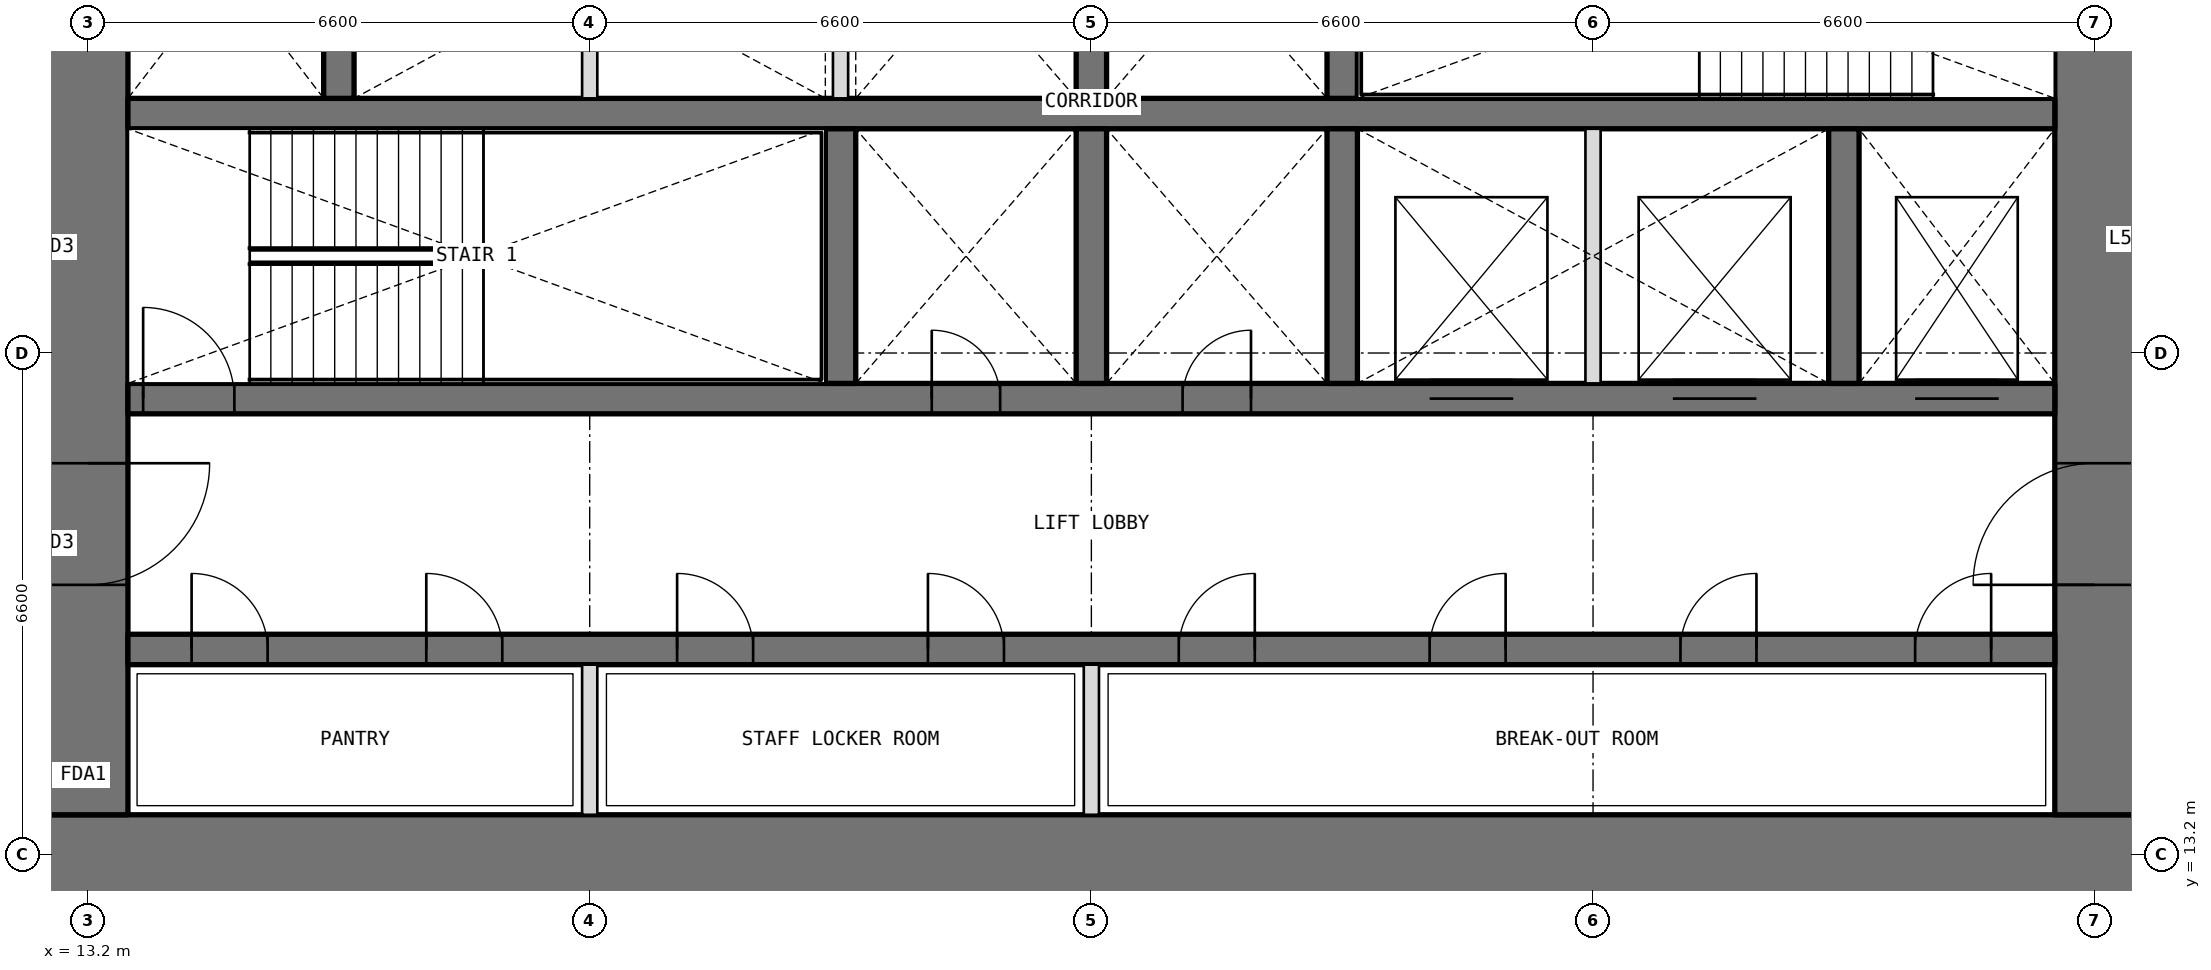
"""IFC4 building model, lengths in metres.
Left out: names, types, materials, properties, quantities, classifications, styles, units other than length and angle.
Written with IfcOpenShell. Run it as: python <this file> out.ifc"""

import sys

from ifc_helpers import new_model, si_unit, direction, frame, frame_2d, origin, place, context, subcontext, project, spatial, rectangle, extrude, element, fill, save


model = new_model("IFC4")
c1 = context("Model", 3, precision=1e-05, world=origin(), true_north=direction((0.0, 1.0)))
c2 = subcontext(c1, "Body", "Model", "MODEL_VIEW")
j1 = project(units=[si_unit("LENGTHUNIT", "METRE"), si_unit("PLANEANGLEUNIT", "RADIAN")], contexts=[c1])
p1 = place(None, origin())
s1 = spatial("IfcSite", under=j1, at=p1, CompositionType="ELEMENT")
p2 = place(p1, origin())
s2 = spatial("IfcBuilding", under=s1, at=p2, CompositionType="ELEMENT")
p3 = place(p2, frame((0.0, 0.0, 233.4)))
s3 = spatial("IfcBuildingStorey", under=s2, at=p3, CompositionType="ELEMENT", Elevation=233.4)
p4 = place(p3, frame((12.675, 13.2, 0.0), z_axis=(0.0, 0.0, 1.0), x_axis=(1.0, 0.0, 0.0)))
e1 = element("IfcWall", 1, at=p4, inside=s3, PredefinedType="SHEAR", context=c2, shape_type="SweptSolid", body=[
    extrude(rectangle(XDim=27.45, YDim=1.05, at=frame_2d((13.725, 0.0))), origin(), (0.0, 0.0, 1.0), 4.2),
])
p5 = place(p3, frame((39.6, 13.725, 0.0), z_axis=(0.0, 0.0, 1.0), x_axis=(0.0, 1.0, 0.0)))
e2 = element("IfcWall", 2, at=p5, inside=s3, PredefinedType="SHEAR", context=c2, shape_type="SweptSolid", body=[
    extrude(rectangle(XDim=18.75, YDim=1.05, at=frame_2d((9.375, 0.0))), origin(), (0.0, 0.0, 1.0), 4.2),
])
p6 = place(p5, frame((3.025, 0.0, 0.0)))
e3 = element("IfcOpeningElement", 3, at=p6, cuts=e2, PredefinedType="OPENING", context=c2, shape_type="SweptSolid", body=[
    extrude(rectangle(XDim=1.6, YDim=2.1, at=frame_2d((0.8, 1.05))), frame((0.0, 0.535, 0.0), z_axis=(0.0, -1.0, 0.0), x_axis=(1.0, 0.0, 0.0)), (0.0, 0.0, 1.0), 1.07),
])
p7 = place(p5, frame((13.825, 0.0, 0.0)))
e4 = element("IfcOpeningElement", 4, at=p7, cuts=e2, PredefinedType="OPENING", context=c2, shape_type="SweptSolid", body=[
    extrude(rectangle(XDim=1.6, YDim=2.1, at=frame_2d((0.8, 1.05))), frame((0.0, 0.535, 0.0), z_axis=(0.0, -1.0, 0.0), x_axis=(1.0, 0.0, 0.0)), (0.0, 0.0, 1.0), 1.07),
])
p8 = place(p3, frame((13.2, 32.475, 0.0), z_axis=(0.0, 0.0, 1.0), x_axis=(0.0, -1.0, 0.0)))
e5 = element("IfcWall", 5, at=p8, inside=s3, PredefinedType="SHEAR", context=c2, shape_type="SweptSolid", body=[
    extrude(rectangle(XDim=18.75, YDim=1.05, at=frame_2d((9.375, 0.0))), origin(), (0.0, 0.0, 1.0), 4.2),
])
p9 = place(p8, frame((14.125, 0.0, 0.0)))
e6 = element("IfcOpeningElement", 6, at=p9, cuts=e5, PredefinedType="OPENING", context=c2, shape_type="SweptSolid", body=[
    extrude(rectangle(XDim=1.6, YDim=2.1, at=frame_2d((0.8, 1.05))), frame((0.0, 0.535, 0.0), z_axis=(0.0, -1.0, 0.0), x_axis=(1.0, 0.0, 0.0)), (0.0, 0.0, 1.0), 1.07),
])
p10 = place(p8, frame((3.325, 0.0, 0.0)))
e7 = element("IfcOpeningElement", 7, at=p10, cuts=e5, PredefinedType="OPENING", context=c2, shape_type="SweptSolid", body=[
    extrude(rectangle(XDim=1.6, YDim=2.1, at=frame_2d((0.8, 1.05))), frame((0.0, 0.535, 0.0), z_axis=(0.0, -1.0, 0.0), x_axis=(1.0, 0.0, 0.0)), (0.0, 0.0, 1.0), 1.07),
])
p11 = place(p3, frame((13.725, 15.9, 0.0), z_axis=(0.0, 0.0, 1.0), x_axis=(1.0, 0.0, 0.0)))
e8 = element("IfcWall", 8, at=p11, inside=s3, PredefinedType="SHEAR", context=c2, shape_type="SweptSolid", body=[
    extrude(rectangle(XDim=25.35, YDim=0.4, at=frame_2d((12.675, 0.0))), origin(), (0.0, 0.0, 1.0), 4.2),
])
p12 = place(p11, frame((0.837, 0.0, 0.0)))
e9 = element("IfcOpeningElement", 9, at=p12, cuts=e8, PredefinedType="OPENING", context=c2, shape_type="SweptSolid", body=[
    extrude(rectangle(XDim=1.0, YDim=2.1, at=frame_2d((0.5, 1.05))), frame((0.0, 0.21, 0.0), z_axis=(0.0, -1.0, 0.0), x_axis=(1.0, 0.0, 0.0)), (0.0, 0.0, 1.0), 0.42),
])
p13 = place(p11, frame((3.925, 0.0, 0.0)))
e10 = element("IfcOpeningElement", 10, at=p13, cuts=e8, PredefinedType="OPENING", context=c2, shape_type="SweptSolid", body=[
    extrude(rectangle(XDim=1.0, YDim=2.1, at=frame_2d((0.5, 1.05))), frame((0.0, 0.21, 0.0), z_axis=(0.0, -1.0, 0.0), x_axis=(1.0, 0.0, 0.0)), (0.0, 0.0, 1.0), 0.42),
])
p14 = place(p11, frame((7.225, 0.0, 0.0)))
e11 = element("IfcOpeningElement", 11, at=p14, cuts=e8, PredefinedType="OPENING", context=c2, shape_type="SweptSolid", body=[
    extrude(rectangle(XDim=1.0, YDim=2.1, at=frame_2d((0.5, 1.05))), frame((0.0, 0.21, 0.0), z_axis=(0.0, -1.0, 0.0), x_axis=(1.0, 0.0, 0.0)), (0.0, 0.0, 1.0), 0.42),
])
p15 = place(p11, frame((10.525, 0.0, 0.0)))
e12 = element("IfcOpeningElement", 12, at=p15, cuts=e8, PredefinedType="OPENING", context=c2, shape_type="SweptSolid", body=[
    extrude(rectangle(XDim=1.0, YDim=2.1, at=frame_2d((0.5, 1.05))), frame((0.0, 0.21, 0.0), z_axis=(0.0, -1.0, 0.0), x_axis=(1.0, 0.0, 0.0)), (0.0, 0.0, 1.0), 0.42),
])
p16 = place(p11, frame((13.825, 0.0, 0.0)))
e13 = element("IfcOpeningElement", 13, at=p16, cuts=e8, PredefinedType="OPENING", context=c2, shape_type="SweptSolid", body=[
    extrude(rectangle(XDim=1.0, YDim=2.1, at=frame_2d((0.5, 1.05))), frame((0.0, 0.21, 0.0), z_axis=(0.0, -1.0, 0.0), x_axis=(1.0, 0.0, 0.0)), (0.0, 0.0, 1.0), 0.42),
])
p17 = place(p11, frame((17.125, 0.0, 0.0)))
e14 = element("IfcOpeningElement", 14, at=p17, cuts=e8, PredefinedType="OPENING", context=c2, shape_type="SweptSolid", body=[
    extrude(rectangle(XDim=1.0, YDim=2.1, at=frame_2d((0.5, 1.05))), frame((0.0, 0.21, 0.0), z_axis=(0.0, -1.0, 0.0), x_axis=(1.0, 0.0, 0.0)), (0.0, 0.0, 1.0), 0.42),
])
p18 = place(p11, frame((20.425, 0.0, 0.0)))
e15 = element("IfcOpeningElement", 15, at=p18, cuts=e8, PredefinedType="OPENING", context=c2, shape_type="SweptSolid", body=[
    extrude(rectangle(XDim=1.0, YDim=2.1, at=frame_2d((0.5, 1.05))), frame((0.0, 0.21, 0.0), z_axis=(0.0, -1.0, 0.0), x_axis=(1.0, 0.0, 0.0)), (0.0, 0.0, 1.0), 0.42),
])
p19 = place(p11, frame((23.512, 0.0, 0.0)))
e16 = element("IfcOpeningElement", 16, at=p19, cuts=e8, PredefinedType="OPENING", context=c2, shape_type="SweptSolid", body=[
    extrude(rectangle(XDim=1.0, YDim=2.1, at=frame_2d((0.5, 1.05))), frame((0.0, 0.21, 0.0), z_axis=(0.0, -1.0, 0.0), x_axis=(1.0, 0.0, 0.0)), (0.0, 0.0, 1.0), 0.42),
])
p20 = place(p3, frame((13.725, 19.2, 0.0), z_axis=(0.0, 0.0, 1.0), x_axis=(1.0, 0.0, 0.0)))
e17 = element("IfcWall", 17, at=p20, inside=s3, PredefinedType="SHEAR", context=c2, shape_type="SweptSolid", body=[
    extrude(rectangle(XDim=25.35, YDim=0.4, at=frame_2d((12.675, 0.0))), origin(), (0.0, 0.0, 1.0), 4.2),
])
p21 = place(p20, frame((10.575, 0.0, 0.0)))
e18 = element("IfcOpeningElement", 18, at=p21, cuts=e17, PredefinedType="OPENING", context=c2, shape_type="SweptSolid", body=[
    extrude(rectangle(XDim=0.9, YDim=2.1, at=frame_2d((0.45, 1.05))), frame((0.0, 0.21, 0.0), z_axis=(0.0, -1.0, 0.0), x_axis=(1.0, 0.0, 0.0)), (0.0, 0.0, 1.0), 0.42),
])
p22 = place(p20, frame((13.875, 0.0, 0.0)))
e19 = element("IfcOpeningElement", 19, at=p22, cuts=e17, PredefinedType="OPENING", context=c2, shape_type="SweptSolid", body=[
    extrude(rectangle(XDim=0.9, YDim=2.1, at=frame_2d((0.45, 1.05))), frame((0.0, 0.21, 0.0), z_axis=(0.0, -1.0, 0.0), x_axis=(1.0, 0.0, 0.0)), (0.0, 0.0, 1.0), 0.42),
])
p23 = place(p20, frame((0.2, 0.0, 0.0)))
e20 = element("IfcOpeningElement", 20, at=p23, cuts=e17, PredefinedType="OPENING", context=c2, shape_type="SweptSolid", body=[
    extrude(rectangle(XDim=1.2, YDim=2.1, at=frame_2d((0.6, 1.05))), frame((0.0, 0.21, 0.0), z_axis=(0.0, -1.0, 0.0), x_axis=(1.0, 0.0, 0.0)), (0.0, 0.0, 1.0), 0.42),
])
p24 = place(p20, frame((23.512, 0.0, 0.0)))
e21 = element("IfcOpeningElement", 21, at=p24, cuts=e17, PredefinedType="OPENING", context=c2, shape_type="SweptSolid", body=[
    extrude(rectangle(XDim=1.1, YDim=2.1, at=frame_2d((0.55, 1.05))), frame((0.0, 0.21, 0.0), z_axis=(0.0, -1.0, 0.0), x_axis=(1.0, 0.0, 0.0)), (0.0, 0.0, 1.0), 0.42),
])
p25 = place(p20, frame((17.125, 0.0, 0.0)))
e22 = element("IfcOpeningElement", 22, at=p25, cuts=e17, PredefinedType="OPENING", context=c2, shape_type="SweptSolid", body=[
    extrude(rectangle(XDim=1.1, YDim=2.1, at=frame_2d((0.55, 1.05))), frame((0.0, 0.21, 0.0), z_axis=(0.0, -1.0, 0.0), x_axis=(1.0, 0.0, 0.0)), (0.0, 0.0, 1.0), 0.42),
])
p26 = place(p20, frame((20.325, 0.0, 0.0)))
e23 = element("IfcOpeningElement", 23, at=p26, cuts=e17, PredefinedType="OPENING", context=c2, shape_type="SweptSolid", body=[
    extrude(rectangle(XDim=1.1, YDim=2.1, at=frame_2d((0.55, 1.05))), frame((0.0, 0.21, 0.0), z_axis=(0.0, -1.0, 0.0), x_axis=(1.0, 0.0, 0.0)), (0.0, 0.0, 1.0), 0.42),
])
p27 = place(p3, frame((13.725, 22.95, 0.0), z_axis=(0.0, 0.0, 1.0), x_axis=(1.0, 0.0, 0.0)))
e24 = element("IfcWall", 24, at=p27, inside=s3, PredefinedType="SHEAR", context=c2, shape_type="SweptSolid", body=[
    extrude(rectangle(XDim=25.35, YDim=0.4, at=frame_2d((12.675, 0.0))), origin(), (0.0, 0.0, 1.0), 4.2),
])
for number, where, z_axis, x_axis in (
    (25, (23.1, 19.4, 0.0), (0.0, 0.0, 1.0), (0.0, 1.0, 0.0)),
    (26, (26.4, 19.4, 0.0), (0.0, 0.0, 1.0), (0.0, 1.0, 0.0)),
    (27, (29.7, 19.4, 0.0), (0.0, 0.0, 1.0), (0.0, 1.0, 0.0)),
    (28, (36.3, 19.4, 0.0), (0.0, 0.0, 1.0), (0.0, 1.0, 0.0)),
    (29, (16.5, 23.15, 0.0), (0.0, 0.0, 1.0), (0.0, 1.0, 0.0)),
    (30, (26.4, 23.15, 0.0), (0.0, 0.0, 1.0), (0.0, 1.0, 0.0)),
    (31, (29.7, 23.15, 0.0), (0.0, 0.0, 1.0), (0.0, 1.0, 0.0)),
):
    element("IfcWall", number, at=place(p3, frame(where, z_axis=z_axis, x_axis=x_axis)), inside=s3, PredefinedType="SHEAR", context=c2, shape_type="SweptSolid", body=[
        extrude(rectangle(XDim=3.35, YDim=0.4, at=frame_2d((1.675, 0.0))), origin(), (0.0, 0.0, 1.0), 4.2),
    ])
for number, where, z_axis, x_axis in (
    (32, (19.8, 13.725, 0.0), (0.0, 0.0, 1.0), (0.0, 1.0, 0.0)),
    (33, (26.4, 13.725, 0.0), (0.0, 0.0, 1.0), (0.0, 1.0, 0.0)),
):
    element("IfcWall", number, at=place(p3, frame(where, z_axis=z_axis, x_axis=x_axis)), inside=s3, PredefinedType="PARTITIONING", context=c2, shape_type="SweptSolid", body=[
        extrude(rectangle(XDim=1.975, YDim=0.2, at=frame_2d((0.987, 0.0))), origin(), (0.0, 0.0, 1.0), 4.2),
    ])
for number, where, z_axis, x_axis in (
    (34, (33.0, 19.4, 0.0), (0.0, 0.0, 1.0), (0.0, 1.0, 0.0)),
    (35, (19.8, 23.15, 0.0), (0.0, 0.0, 1.0), (0.0, 1.0, 0.0)),
    (36, (23.1, 23.15, 0.0), (0.0, 0.0, 1.0), (0.0, 1.0, 0.0)),
):
    element("IfcWall", number, at=place(p3, frame(where, z_axis=z_axis, x_axis=x_axis)), inside=s3, PredefinedType="PARTITIONING", context=c2, shape_type="SweptSolid", body=[
        extrude(rectangle(XDim=3.35, YDim=0.2, at=frame_2d((1.675, 0.0))), origin(), (0.0, 0.0, 1.0), 4.2),
    ])
p28 = place(p21, origin())
e37 = element("IfcDoor", 37, at=p28, inside=s3, OperationType="SINGLE_SWING_LEFT", PredefinedType="DOOR", context=c2, shape_type="SweptSolid", body=[
    extrude(rectangle(XDim=0.9, YDim=2.1, at=frame_2d((0.45, 1.05))), frame((0.0, 0.025, 0.0), z_axis=(0.0, -1.0, 0.0), x_axis=(1.0, 0.0, 0.0)), (0.0, 0.0, 1.0), 0.05),
])
fill(e18, e37)
p29 = place(p22, origin())
e38 = element("IfcDoor", 38, at=p29, inside=s3, OperationType="SINGLE_SWING_RIGHT", PredefinedType="DOOR", context=c2, shape_type="SweptSolid", body=[
    extrude(rectangle(XDim=0.9, YDim=2.1, at=frame_2d((0.45, 1.05))), frame((0.0, 0.025, 0.0), z_axis=(0.0, -1.0, 0.0), x_axis=(1.0, 0.0, 0.0)), (0.0, 0.0, 1.0), 0.05),
])
fill(e19, e38)
p30 = place(p12, origin())
e39 = element("IfcDoor", 39, at=p30, inside=s3, OperationType="SINGLE_SWING_LEFT", PredefinedType="DOOR", context=c2, shape_type="SweptSolid", body=[
    extrude(rectangle(XDim=1.0, YDim=2.1, at=frame_2d((0.5, 1.05))), frame((0.0, 0.025, 0.0), z_axis=(0.0, -1.0, 0.0), x_axis=(1.0, 0.0, 0.0)), (0.0, 0.0, 1.0), 0.05),
])
fill(e9, e39)
p31 = place(p13, origin())
e40 = element("IfcDoor", 40, at=p31, inside=s3, OperationType="SINGLE_SWING_LEFT", PredefinedType="DOOR", context=c2, shape_type="SweptSolid", body=[
    extrude(rectangle(XDim=1.0, YDim=2.1, at=frame_2d((0.5, 1.05))), frame((0.0, 0.025, 0.0), z_axis=(0.0, -1.0, 0.0), x_axis=(1.0, 0.0, 0.0)), (0.0, 0.0, 1.0), 0.05),
])
fill(e10, e40)
p32 = place(p14, origin())
e41 = element("IfcDoor", 41, at=p32, inside=s3, OperationType="SINGLE_SWING_LEFT", PredefinedType="DOOR", context=c2, shape_type="SweptSolid", body=[
    extrude(rectangle(XDim=1.0, YDim=2.1, at=frame_2d((0.5, 1.05))), frame((0.0, 0.025, 0.0), z_axis=(0.0, -1.0, 0.0), x_axis=(1.0, 0.0, 0.0)), (0.0, 0.0, 1.0), 0.05),
])
fill(e11, e41)
p33 = place(p15, origin())
e42 = element("IfcDoor", 42, at=p33, inside=s3, OperationType="SINGLE_SWING_LEFT", PredefinedType="DOOR", context=c2, shape_type="SweptSolid", body=[
    extrude(rectangle(XDim=1.0, YDim=2.1, at=frame_2d((0.5, 1.05))), frame((0.0, 0.025, 0.0), z_axis=(0.0, -1.0, 0.0), x_axis=(1.0, 0.0, 0.0)), (0.0, 0.0, 1.0), 0.05),
])
fill(e12, e42)
p34 = place(p16, origin())
e43 = element("IfcDoor", 43, at=p34, inside=s3, OperationType="SINGLE_SWING_RIGHT", PredefinedType="DOOR", context=c2, shape_type="SweptSolid", body=[
    extrude(rectangle(XDim=1.0, YDim=2.1, at=frame_2d((0.5, 1.05))), frame((0.0, 0.025, 0.0), z_axis=(0.0, -1.0, 0.0), x_axis=(1.0, 0.0, 0.0)), (0.0, 0.0, 1.0), 0.05),
])
fill(e13, e43)
p35 = place(p17, origin())
e44 = element("IfcDoor", 44, at=p35, inside=s3, OperationType="SINGLE_SWING_RIGHT", PredefinedType="DOOR", context=c2, shape_type="SweptSolid", body=[
    extrude(rectangle(XDim=1.0, YDim=2.1, at=frame_2d((0.5, 1.05))), frame((0.0, 0.025, 0.0), z_axis=(0.0, -1.0, 0.0), x_axis=(1.0, 0.0, 0.0)), (0.0, 0.0, 1.0), 0.05),
])
fill(e14, e44)
p36 = place(p18, origin())
e45 = element("IfcDoor", 45, at=p36, inside=s3, OperationType="SINGLE_SWING_RIGHT", PredefinedType="DOOR", context=c2, shape_type="SweptSolid", body=[
    extrude(rectangle(XDim=1.0, YDim=2.1, at=frame_2d((0.5, 1.05))), frame((0.0, 0.025, 0.0), z_axis=(0.0, -1.0, 0.0), x_axis=(1.0, 0.0, 0.0)), (0.0, 0.0, 1.0), 0.05),
])
fill(e15, e45)
p37 = place(p19, origin())
e46 = element("IfcDoor", 46, at=p37, inside=s3, OperationType="SINGLE_SWING_RIGHT", PredefinedType="DOOR", context=c2, shape_type="SweptSolid", body=[
    extrude(rectangle(XDim=1.0, YDim=2.1, at=frame_2d((0.5, 1.05))), frame((0.0, 0.025, 0.0), z_axis=(0.0, -1.0, 0.0), x_axis=(1.0, 0.0, 0.0)), (0.0, 0.0, 1.0), 0.05),
])
fill(e16, e46)
p38 = place(p23, origin())
e47 = element("IfcDoor", 47, at=p38, inside=s3, OperationType="SINGLE_SWING_LEFT", PredefinedType="DOOR", context=c2, shape_type="SweptSolid", body=[
    extrude(rectangle(XDim=1.2, YDim=2.1, at=frame_2d((0.6, 1.05))), frame((0.0, 0.025, 0.0), z_axis=(0.0, -1.0, 0.0), x_axis=(1.0, 0.0, 0.0)), (0.0, 0.0, 1.0), 0.05),
])
fill(e20, e47)
p39 = place(p9, origin())
e48 = element("IfcDoor", 48, at=p39, inside=s3, OperationType="DOUBLE_DOOR_DOUBLE_SWING", PredefinedType="DOOR", context=c2, shape_type="SweptSolid", body=[
    extrude(rectangle(XDim=1.6, YDim=2.1, at=frame_2d((0.8, 1.05))), frame((0.0, 0.025, 0.0), z_axis=(0.0, -1.0, 0.0), x_axis=(1.0, 0.0, 0.0)), (0.0, 0.0, 1.0), 0.05),
])
fill(e6, e48)
p40 = place(p6, origin())
e49 = element("IfcDoor", 49, at=p40, inside=s3, OperationType="DOUBLE_DOOR_DOUBLE_SWING", PredefinedType="DOOR", context=c2, shape_type="SweptSolid", body=[
    extrude(rectangle(XDim=1.6, YDim=2.1, at=frame_2d((0.8, 1.05))), frame((0.0, 0.025, 0.0), z_axis=(0.0, -1.0, 0.0), x_axis=(1.0, 0.0, 0.0)), (0.0, 0.0, 1.0), 0.05),
])
fill(e3, e49)
p41 = place(p24, origin())
e50 = element("IfcDoor", 50, at=p41, inside=s3, OperationType="DOUBLE_DOOR_SLIDING", PredefinedType="DOOR", context=c2, shape_type="SweptSolid", body=[
    extrude(rectangle(XDim=1.1, YDim=2.1, at=frame_2d((0.55, 1.05))), frame((0.0, 0.025, 0.0), z_axis=(0.0, -1.0, 0.0), x_axis=(1.0, 0.0, 0.0)), (0.0, 0.0, 1.0), 0.05),
])
fill(e21, e50)
p42 = place(p25, origin())
e51 = element("IfcDoor", 51, at=p42, inside=s3, OperationType="DOUBLE_DOOR_SLIDING", PredefinedType="DOOR", context=c2, shape_type="SweptSolid", body=[
    extrude(rectangle(XDim=1.1, YDim=2.1, at=frame_2d((0.55, 1.05))), frame((0.0, 0.025, 0.0), z_axis=(0.0, -1.0, 0.0), x_axis=(1.0, 0.0, 0.0)), (0.0, 0.0, 1.0), 0.05),
])
fill(e22, e51)
p43 = place(p26, origin())
e52 = element("IfcDoor", 52, at=p43, inside=s3, OperationType="DOUBLE_DOOR_SLIDING", PredefinedType="DOOR", context=c2, shape_type="SweptSolid", body=[
    extrude(rectangle(XDim=1.1, YDim=2.1, at=frame_2d((0.55, 1.05))), frame((0.0, 0.025, 0.0), z_axis=(0.0, -1.0, 0.0), x_axis=(1.0, 0.0, 0.0)), (0.0, 0.0, 1.0), 0.05),
])
fill(e23, e52)
save(model, sys.argv[1])
